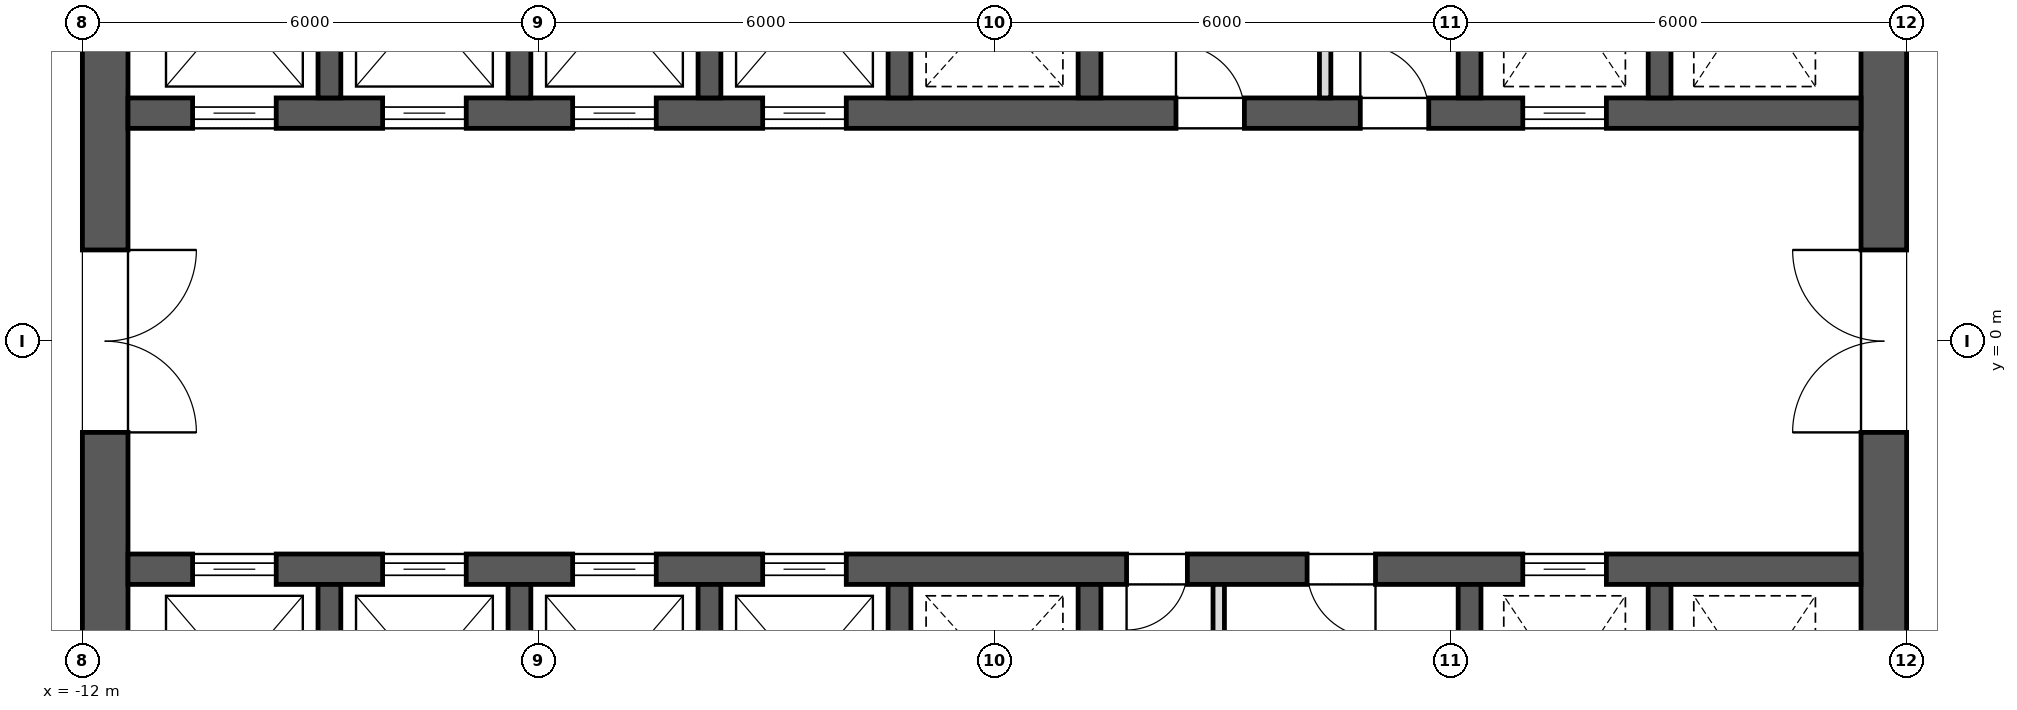
"""IFC4 building model, lengths in metres.
Left out: names, types, materials, properties, quantities, classifications, styles, units other than length and angle.
Written with IfcOpenShell. Run it as: python <this file> out.ifc"""

import sys

from ifc_helpers import new_model, si_unit, direction, frame, frame_2d, origin, place, context, subcontext, project, spatial, rectangle, extrude, element, fill, save


model = new_model("IFC4")
c1 = context("Model", 3, precision=1e-05, world=origin(), true_north=direction((0.0, 1.0)))
c2 = subcontext(c1, "Body", "Model", "MODEL_VIEW")
j1 = project(units=[si_unit("LENGTHUNIT", "METRE"), si_unit("PLANEANGLEUNIT", "RADIAN")], contexts=[c1])
p1 = place(None, origin())
s1 = spatial("IfcSite", under=j1, at=p1, CompositionType="ELEMENT")
p2 = place(p1, origin())
s2 = spatial("IfcBuilding", under=s1, at=p2, CompositionType="ELEMENT")
p3 = place(p2, frame((0.0, 0.0, 178.9)))
s3 = spatial("IfcBuildingStorey", under=s2, at=p3, CompositionType="ELEMENT", Elevation=178.9)
p4 = place(p3, frame((11.7, -11.4, 0.0), z_axis=(0.0, 0.0, 1.0), x_axis=(0.0, 1.0, 0.0)))
e1 = element("IfcWall", 1, at=p4, inside=s3, PredefinedType="SHEAR", context=c2, shape_type="SweptSolid", body=[
    extrude(rectangle(XDim=22.8, YDim=0.6, at=frame_2d((11.4, 0.0))), origin(), (0.0, 0.0, 1.0), 4.0),
])
p5 = place(p4, frame((10.2, 0.0, 0.0)))
e2 = element("IfcOpeningElement", 2, at=p5, cuts=e1, PredefinedType="OPENING", context=c2, shape_type="SweptSolid", body=[
    extrude(rectangle(XDim=2.4, YDim=2.1, at=frame_2d((1.2, 1.05))), frame((0.0, 0.312, 0.0), z_axis=(0.0, -1.0, 0.0), x_axis=(1.0, 0.0, 0.0)), (0.0, 0.0, 1.0), 0.624),
])
p6 = place(p4, frame((19.5, 0.0, 0.0)))
e3 = element("IfcOpeningElement", 3, at=p6, cuts=e1, PredefinedType="OPENING", context=c2, shape_type="SweptSolid", body=[
    extrude(rectangle(XDim=1.2, YDim=2.1, at=frame_2d((0.6, 1.05))), frame((0.0, 0.312, 0.0), z_axis=(0.0, -1.0, 0.0), x_axis=(1.0, 0.0, 0.0)), (0.0, 0.0, 1.0), 0.624),
])
p7 = place(p4, frame((2.1, 0.0, 0.0)))
e4 = element("IfcOpeningElement", 4, at=p7, cuts=e1, PredefinedType="OPENING", context=c2, shape_type="SweptSolid", body=[
    extrude(rectangle(XDim=1.2, YDim=2.1, at=frame_2d((0.6, 1.05))), frame((0.0, 0.312, 0.0), z_axis=(0.0, -1.0, 0.0), x_axis=(1.0, 0.0, 0.0)), (0.0, 0.0, 1.0), 0.624),
])
p8 = place(p3, frame((-11.7, -11.4, 0.0), z_axis=(0.0, 0.0, 1.0), x_axis=(0.0, 1.0, 0.0)))
e5 = element("IfcWall", 5, at=p8, inside=s3, PredefinedType="SHEAR", context=c2, shape_type="SweptSolid", body=[
    extrude(rectangle(XDim=22.8, YDim=0.6, at=frame_2d((11.4, 0.0))), origin(), (0.0, 0.0, 1.0), 4.0),
])
p9 = place(p8, frame((10.2, 0.0, 0.0)))
e6 = element("IfcOpeningElement", 6, at=p9, cuts=e5, PredefinedType="OPENING", context=c2, shape_type="SweptSolid", body=[
    extrude(rectangle(XDim=2.4, YDim=2.1, at=frame_2d((1.2, 1.05))), frame((0.0, 0.312, 0.0), z_axis=(0.0, -1.0, 0.0), x_axis=(1.0, 0.0, 0.0)), (0.0, 0.0, 1.0), 0.624),
])
p10 = place(p8, frame((18.925, 0.0, 0.0)))
e7 = element("IfcOpeningElement", 7, at=p10, cuts=e5, PredefinedType="OPENING", context=c2, shape_type="SweptSolid", body=[
    extrude(rectangle(XDim=1.2, YDim=2.1, at=frame_2d((0.6, 1.05))), frame((0.0, 0.312, 0.0), z_axis=(0.0, -1.0, 0.0), x_axis=(1.0, 0.0, 0.0)), (0.0, 0.0, 1.0), 0.624),
])
p11 = place(p8, frame((2.675, 0.0, 0.0)))
e8 = element("IfcOpeningElement", 8, at=p11, cuts=e5, PredefinedType="OPENING", context=c2, shape_type="SweptSolid", body=[
    extrude(rectangle(XDim=1.2, YDim=2.1, at=frame_2d((0.6, 1.05))), frame((0.0, 0.312, 0.0), z_axis=(0.0, -1.0, 0.0), x_axis=(1.0, 0.0, 0.0)), (0.0, 0.0, 1.0), 0.624),
])
p12 = place(p3, frame((-11.4, 3.0, 0.0), z_axis=(0.0, 0.0, 1.0), x_axis=(1.0, 0.0, 0.0)))
e9 = element("IfcWall", 9, at=p12, inside=s3, PredefinedType="SHEAR", context=c2, shape_type="SweptSolid", body=[
    extrude(rectangle(XDim=22.8, YDim=0.4, at=frame_2d((11.4, 0.0))), origin(), (0.0, 0.0, 1.0), 4.0),
])
p13 = place(p12, frame((0.85, 0.0, 0.0)))
e10 = element("IfcOpeningElement", 10, at=p13, cuts=e9, PredefinedType="OPENING", context=c2, shape_type="SweptSolid", body=[
    extrude(rectangle(XDim=1.1, YDim=2.1, at=frame_2d((0.55, 1.05))), frame((0.0, 0.212, 0.0), z_axis=(0.0, -1.0, 0.0), x_axis=(1.0, 0.0, 0.0)), (0.0, 0.0, 1.0), 0.424),
])
p14 = place(p12, frame((3.35, 0.0, 0.0)))
e11 = element("IfcOpeningElement", 11, at=p14, cuts=e9, PredefinedType="OPENING", context=c2, shape_type="SweptSolid", body=[
    extrude(rectangle(XDim=1.1, YDim=2.1, at=frame_2d((0.55, 1.05))), frame((0.0, 0.212, 0.0), z_axis=(0.0, -1.0, 0.0), x_axis=(1.0, 0.0, 0.0)), (0.0, 0.0, 1.0), 0.424),
])
p15 = place(p12, frame((5.85, 0.0, 0.0)))
e12 = element("IfcOpeningElement", 12, at=p15, cuts=e9, PredefinedType="OPENING", context=c2, shape_type="SweptSolid", body=[
    extrude(rectangle(XDim=1.1, YDim=2.1, at=frame_2d((0.55, 1.05))), frame((0.0, 0.212, 0.0), z_axis=(0.0, -1.0, 0.0), x_axis=(1.0, 0.0, 0.0)), (0.0, 0.0, 1.0), 0.424),
])
p16 = place(p12, frame((8.35, 0.0, 0.0)))
e13 = element("IfcOpeningElement", 13, at=p16, cuts=e9, PredefinedType="OPENING", context=c2, shape_type="SweptSolid", body=[
    extrude(rectangle(XDim=1.1, YDim=2.1, at=frame_2d((0.55, 1.05))), frame((0.0, 0.212, 0.0), z_axis=(0.0, -1.0, 0.0), x_axis=(1.0, 0.0, 0.0)), (0.0, 0.0, 1.0), 0.424),
])
p17 = place(p12, frame((18.35, 0.0, 0.0)))
e14 = element("IfcOpeningElement", 14, at=p17, cuts=e9, PredefinedType="OPENING", context=c2, shape_type="SweptSolid", body=[
    extrude(rectangle(XDim=1.1, YDim=2.1, at=frame_2d((0.55, 1.05))), frame((0.0, 0.212, 0.0), z_axis=(0.0, -1.0, 0.0), x_axis=(1.0, 0.0, 0.0)), (0.0, 0.0, 1.0), 0.424),
])
p18 = place(p12, frame((13.788, 0.0, 0.0)))
e15 = element("IfcOpeningElement", 15, at=p18, cuts=e9, PredefinedType="OPENING", context=c2, shape_type="SweptSolid", body=[
    extrude(rectangle(XDim=0.9, YDim=2.1, at=frame_2d((0.45, 1.05))), frame((0.0, 0.212, 0.0), z_axis=(0.0, -1.0, 0.0), x_axis=(1.0, 0.0, 0.0)), (0.0, 0.0, 1.0), 0.424),
])
p19 = place(p12, frame((16.212, 0.0, 0.0)))
e16 = element("IfcOpeningElement", 16, at=p19, cuts=e9, PredefinedType="OPENING", context=c2, shape_type="SweptSolid", body=[
    extrude(rectangle(XDim=0.9, YDim=2.1, at=frame_2d((0.45, 1.05))), frame((0.0, 0.212, 0.0), z_axis=(0.0, -1.0, 0.0), x_axis=(1.0, 0.0, 0.0)), (0.0, 0.0, 1.0), 0.424),
])
for number, where, z_axis, x_axis in (
    (17, (-8.75, 3.2, 0.0), (0.0, 0.0, 1.0), (0.0, 1.0, 0.0)),
    (18, (-6.25, 3.2, 0.0), (0.0, 0.0, 1.0), (0.0, 1.0, 0.0)),
    (19, (-3.75, 3.2, 0.0), (0.0, 0.0, 1.0), (0.0, 1.0, 0.0)),
    (20, (-1.25, 3.2, 0.0), (0.0, 0.0, 1.0), (0.0, 1.0, 0.0)),
    (21, (1.25, 3.2, 0.0), (0.0, 0.0, 1.0), (0.0, 1.0, 0.0)),
    (22, (6.25, 3.2, 0.0), (0.0, 0.0, 1.0), (0.0, 1.0, 0.0)),
    (23, (8.75, 3.2, 0.0), (0.0, 0.0, 1.0), (0.0, 1.0, 0.0)),
):
    element("IfcWall", number, at=place(p3, frame(where, z_axis=z_axis, x_axis=x_axis)), inside=s3, PredefinedType="SHEAR", context=c2, shape_type="SweptSolid", body=[
        extrude(rectangle(XDim=2.9, YDim=0.3, at=frame_2d((1.45, 0.0))), origin(), (0.0, 0.0, 1.0), 4.0),
    ])
p20 = place(p3, frame((-11.4, -3.0, 0.0), z_axis=(0.0, 0.0, 1.0), x_axis=(1.0, 0.0, 0.0)))
e24 = element("IfcWall", 24, at=p20, inside=s3, PredefinedType="SHEAR", context=c2, shape_type="SweptSolid", body=[
    extrude(rectangle(XDim=22.8, YDim=0.4, at=frame_2d((11.4, 0.0))), origin(), (0.0, 0.0, 1.0), 4.0),
])
p21 = place(p20, frame((0.85, 0.0, 0.0)))
e25 = element("IfcOpeningElement", 25, at=p21, cuts=e24, PredefinedType="OPENING", context=c2, shape_type="SweptSolid", body=[
    extrude(rectangle(XDim=1.1, YDim=2.1, at=frame_2d((0.55, 1.05))), frame((0.0, 0.212, 0.0), z_axis=(0.0, -1.0, 0.0), x_axis=(1.0, 0.0, 0.0)), (0.0, 0.0, 1.0), 0.424),
])
p22 = place(p20, frame((3.35, 0.0, 0.0)))
e26 = element("IfcOpeningElement", 26, at=p22, cuts=e24, PredefinedType="OPENING", context=c2, shape_type="SweptSolid", body=[
    extrude(rectangle(XDim=1.1, YDim=2.1, at=frame_2d((0.55, 1.05))), frame((0.0, 0.212, 0.0), z_axis=(0.0, -1.0, 0.0), x_axis=(1.0, 0.0, 0.0)), (0.0, 0.0, 1.0), 0.424),
])
p23 = place(p20, frame((5.85, 0.0, 0.0)))
e27 = element("IfcOpeningElement", 27, at=p23, cuts=e24, PredefinedType="OPENING", context=c2, shape_type="SweptSolid", body=[
    extrude(rectangle(XDim=1.1, YDim=2.1, at=frame_2d((0.55, 1.05))), frame((0.0, 0.212, 0.0), z_axis=(0.0, -1.0, 0.0), x_axis=(1.0, 0.0, 0.0)), (0.0, 0.0, 1.0), 0.424),
])
p24 = place(p20, frame((8.35, 0.0, 0.0)))
e28 = element("IfcOpeningElement", 28, at=p24, cuts=e24, PredefinedType="OPENING", context=c2, shape_type="SweptSolid", body=[
    extrude(rectangle(XDim=1.1, YDim=2.1, at=frame_2d((0.55, 1.05))), frame((0.0, 0.212, 0.0), z_axis=(0.0, -1.0, 0.0), x_axis=(1.0, 0.0, 0.0)), (0.0, 0.0, 1.0), 0.424),
])
p25 = place(p20, frame((18.35, 0.0, 0.0)))
e29 = element("IfcOpeningElement", 29, at=p25, cuts=e24, PredefinedType="OPENING", context=c2, shape_type="SweptSolid", body=[
    extrude(rectangle(XDim=1.1, YDim=2.1, at=frame_2d((0.55, 1.05))), frame((0.0, 0.212, 0.0), z_axis=(0.0, -1.0, 0.0), x_axis=(1.0, 0.0, 0.0)), (0.0, 0.0, 1.0), 0.424),
])
p26 = place(p20, frame((13.137, 0.0, 0.0)))
e30 = element("IfcOpeningElement", 30, at=p26, cuts=e24, PredefinedType="OPENING", context=c2, shape_type="SweptSolid", body=[
    extrude(rectangle(XDim=0.8, YDim=2.1, at=frame_2d((0.4, 1.05))), frame((0.0, 0.212, 0.0), z_axis=(0.0, -1.0, 0.0), x_axis=(1.0, 0.0, 0.0)), (0.0, 0.0, 1.0), 0.424),
])
p27 = place(p20, frame((15.512, 0.0, 0.0)))
e31 = element("IfcOpeningElement", 31, at=p27, cuts=e24, PredefinedType="OPENING", context=c2, shape_type="SweptSolid", body=[
    extrude(rectangle(XDim=0.9, YDim=2.1, at=frame_2d((0.45, 1.05))), frame((0.0, 0.212, 0.0), z_axis=(0.0, -1.0, 0.0), x_axis=(1.0, 0.0, 0.0)), (0.0, 0.0, 1.0), 0.424),
])
for number, where, z_axis, x_axis in (
    (32, (-8.75, -6.1, 0.0), (0.0, 0.0, 1.0), (0.0, 1.0, 0.0)),
    (33, (-6.25, -6.1, 0.0), (0.0, 0.0, 1.0), (0.0, 1.0, 0.0)),
    (34, (-3.75, -6.1, 0.0), (0.0, 0.0, 1.0), (0.0, 1.0, 0.0)),
    (35, (-1.25, -6.1, 0.0), (0.0, 0.0, 1.0), (0.0, 1.0, 0.0)),
    (36, (1.25, -6.1, 0.0), (0.0, 0.0, 1.0), (0.0, 1.0, 0.0)),
    (37, (6.25, -6.1, 0.0), (0.0, 0.0, 1.0), (0.0, 1.0, 0.0)),
    (38, (8.75, -6.1, 0.0), (0.0, 0.0, 1.0), (0.0, 1.0, 0.0)),
):
    element("IfcWall", number, at=place(p3, frame(where, z_axis=z_axis, x_axis=x_axis)), inside=s3, PredefinedType="SHEAR", context=c2, shape_type="SweptSolid", body=[
        extrude(rectangle(XDim=2.9, YDim=0.3, at=frame_2d((1.45, 0.0))), origin(), (0.0, 0.0, 1.0), 4.0),
    ])
for number, where, z_axis, x_axis in (
    (39, (4.35, 3.2, 0.0), (0.0, 0.0, 1.0), (0.0, 1.0, 0.0)),
    (40, (2.95, -6.1, 0.0), (0.0, 0.0, 1.0), (0.0, 1.0, 0.0)),
):
    element("IfcWall", number, at=place(p3, frame(where, z_axis=z_axis, x_axis=x_axis)), inside=s3, PredefinedType="PARTITIONING", context=c2, shape_type="SweptSolid", body=[
        extrude(rectangle(XDim=2.9, YDim=0.15, at=frame_2d((1.45, 0.0))), origin(), (0.0, 0.0, 1.0), 3.7),
    ])
p28 = place(p13, origin())
e41 = element("IfcDoor", 41, at=p28, inside=s3, OperationType="SLIDING_TO_LEFT", PredefinedType="DOOR", context=c2, shape_type="SweptSolid", body=[
    extrude(rectangle(XDim=1.1, YDim=2.1, at=frame_2d((0.55, 1.05))), frame((0.0, 0.025, 0.0), z_axis=(0.0, -1.0, 0.0), x_axis=(1.0, 0.0, 0.0)), (0.0, 0.0, 1.0), 0.05),
])
fill(e10, e41)
p29 = place(p14, origin())
e42 = element("IfcDoor", 42, at=p29, inside=s3, OperationType="SLIDING_TO_LEFT", PredefinedType="DOOR", context=c2, shape_type="SweptSolid", body=[
    extrude(rectangle(XDim=1.1, YDim=2.1, at=frame_2d((0.55, 1.05))), frame((0.0, 0.025, 0.0), z_axis=(0.0, -1.0, 0.0), x_axis=(1.0, 0.0, 0.0)), (0.0, 0.0, 1.0), 0.05),
])
fill(e11, e42)
p30 = place(p21, origin())
e43 = element("IfcDoor", 43, at=p30, inside=s3, OperationType="SLIDING_TO_LEFT", PredefinedType="DOOR", context=c2, shape_type="SweptSolid", body=[
    extrude(rectangle(XDim=1.1, YDim=2.1, at=frame_2d((0.55, 1.05))), frame((0.0, 0.025, 0.0), z_axis=(0.0, -1.0, 0.0), x_axis=(1.0, 0.0, 0.0)), (0.0, 0.0, 1.0), 0.05),
])
fill(e25, e43)
p31 = place(p22, origin())
e44 = element("IfcDoor", 44, at=p31, inside=s3, OperationType="SLIDING_TO_LEFT", PredefinedType="DOOR", context=c2, shape_type="SweptSolid", body=[
    extrude(rectangle(XDim=1.1, YDim=2.1, at=frame_2d((0.55, 1.05))), frame((0.0, 0.025, 0.0), z_axis=(0.0, -1.0, 0.0), x_axis=(1.0, 0.0, 0.0)), (0.0, 0.0, 1.0), 0.05),
])
fill(e26, e44)
p32 = place(p15, origin())
e45 = element("IfcDoor", 45, at=p32, inside=s3, OperationType="SLIDING_TO_LEFT", PredefinedType="DOOR", context=c2, shape_type="SweptSolid", body=[
    extrude(rectangle(XDim=1.1, YDim=2.1, at=frame_2d((0.55, 1.05))), frame((0.0, 0.025, 0.0), z_axis=(0.0, -1.0, 0.0), x_axis=(1.0, 0.0, 0.0)), (0.0, 0.0, 1.0), 0.05),
])
fill(e12, e45)
p33 = place(p16, origin())
e46 = element("IfcDoor", 46, at=p33, inside=s3, OperationType="SLIDING_TO_LEFT", PredefinedType="DOOR", context=c2, shape_type="SweptSolid", body=[
    extrude(rectangle(XDim=1.1, YDim=2.1, at=frame_2d((0.55, 1.05))), frame((0.0, 0.025, 0.0), z_axis=(0.0, -1.0, 0.0), x_axis=(1.0, 0.0, 0.0)), (0.0, 0.0, 1.0), 0.05),
])
fill(e13, e46)
p34 = place(p23, origin())
e47 = element("IfcDoor", 47, at=p34, inside=s3, OperationType="SLIDING_TO_LEFT", PredefinedType="DOOR", context=c2, shape_type="SweptSolid", body=[
    extrude(rectangle(XDim=1.1, YDim=2.1, at=frame_2d((0.55, 1.05))), frame((0.0, 0.025, 0.0), z_axis=(0.0, -1.0, 0.0), x_axis=(1.0, 0.0, 0.0)), (0.0, 0.0, 1.0), 0.05),
])
fill(e27, e47)
p35 = place(p24, origin())
e48 = element("IfcDoor", 48, at=p35, inside=s3, OperationType="SLIDING_TO_LEFT", PredefinedType="DOOR", context=c2, shape_type="SweptSolid", body=[
    extrude(rectangle(XDim=1.1, YDim=2.1, at=frame_2d((0.55, 1.05))), frame((0.0, 0.025, 0.0), z_axis=(0.0, -1.0, 0.0), x_axis=(1.0, 0.0, 0.0)), (0.0, 0.0, 1.0), 0.05),
])
fill(e28, e48)
p36 = place(p17, origin())
e49 = element("IfcDoor", 49, at=p36, inside=s3, OperationType="SLIDING_TO_LEFT", PredefinedType="DOOR", context=c2, shape_type="SweptSolid", body=[
    extrude(rectangle(XDim=1.1, YDim=2.1, at=frame_2d((0.55, 1.05))), frame((0.0, 0.025, 0.0), z_axis=(0.0, -1.0, 0.0), x_axis=(1.0, 0.0, 0.0)), (0.0, 0.0, 1.0), 0.05),
])
fill(e14, e49)
p37 = place(p25, origin())
e50 = element("IfcDoor", 50, at=p37, inside=s3, OperationType="SLIDING_TO_LEFT", PredefinedType="DOOR", context=c2, shape_type="SweptSolid", body=[
    extrude(rectangle(XDim=1.1, YDim=2.1, at=frame_2d((0.55, 1.05))), frame((0.0, 0.025, 0.0), z_axis=(0.0, -1.0, 0.0), x_axis=(1.0, 0.0, 0.0)), (0.0, 0.0, 1.0), 0.05),
])
fill(e29, e50)
p38 = place(p9, frame((2.4, 0.0, 0.0), z_axis=(0.0, 0.0, 1.0), x_axis=(-1.0, 0.0, 0.0)))
e51 = element("IfcDoor", 51, at=p38, inside=s3, OperationType="DOUBLE_DOOR_SINGLE_SWING", PredefinedType="DOOR", context=c2, shape_type="SweptSolid", body=[
    extrude(rectangle(XDim=2.4, YDim=2.1, at=frame_2d((1.2, 1.05))), frame((0.0, 0.025, 0.0), z_axis=(0.0, -1.0, 0.0), x_axis=(1.0, 0.0, 0.0)), (0.0, 0.0, 1.0), 0.05),
])
fill(e6, e51)
p39 = place(p5, origin())
e52 = element("IfcDoor", 52, at=p39, inside=s3, OperationType="DOUBLE_DOOR_SINGLE_SWING", PredefinedType="DOOR", context=c2, shape_type="SweptSolid", body=[
    extrude(rectangle(XDim=2.4, YDim=2.1, at=frame_2d((1.2, 1.05))), frame((0.0, 0.025, 0.0), z_axis=(0.0, -1.0, 0.0), x_axis=(1.0, 0.0, 0.0)), (0.0, 0.0, 1.0), 0.05),
])
fill(e2, e52)
p40 = place(p18, origin())
e53 = element("IfcDoor", 53, at=p40, inside=s3, OperationType="SINGLE_SWING_RIGHT", PredefinedType="DOOR", context=c2, shape_type="SweptSolid", body=[
    extrude(rectangle(XDim=0.9, YDim=2.1, at=frame_2d((0.45, 1.05))), frame((0.0, 0.025, 0.0), z_axis=(0.0, -1.0, 0.0), x_axis=(1.0, 0.0, 0.0)), (0.0, 0.0, 1.0), 0.05),
])
fill(e15, e53)
p41 = place(p19, origin())
e54 = element("IfcDoor", 54, at=p41, inside=s3, OperationType="SINGLE_SWING_RIGHT", PredefinedType="DOOR", context=c2, shape_type="SweptSolid", body=[
    extrude(rectangle(XDim=0.9, YDim=2.1, at=frame_2d((0.45, 1.05))), frame((0.0, 0.025, 0.0), z_axis=(0.0, -1.0, 0.0), x_axis=(1.0, 0.0, 0.0)), (0.0, 0.0, 1.0), 0.05),
])
fill(e16, e54)
p42 = place(p26, frame((0.8, 0.0, 0.0), z_axis=(0.0, 0.0, 1.0), x_axis=(-1.0, 0.0, 0.0)))
e55 = element("IfcDoor", 55, at=p42, inside=s3, OperationType="SINGLE_SWING_LEFT", PredefinedType="DOOR", context=c2, shape_type="SweptSolid", body=[
    extrude(rectangle(XDim=0.8, YDim=2.1, at=frame_2d((0.4, 1.05))), frame((0.0, 0.025, 0.0), z_axis=(0.0, -1.0, 0.0), x_axis=(1.0, 0.0, 0.0)), (0.0, 0.0, 1.0), 0.05),
])
fill(e30, e55)
p43 = place(p27, frame((0.9, 0.0, 0.0), z_axis=(0.0, 0.0, 1.0), x_axis=(-1.0, 0.0, 0.0)))
e56 = element("IfcDoor", 56, at=p43, inside=s3, OperationType="SINGLE_SWING_RIGHT", PredefinedType="DOOR", context=c2, shape_type="SweptSolid", body=[
    extrude(rectangle(XDim=0.9, YDim=2.1, at=frame_2d((0.45, 1.05))), frame((0.0, 0.025, 0.0), z_axis=(0.0, -1.0, 0.0), x_axis=(1.0, 0.0, 0.0)), (0.0, 0.0, 1.0), 0.05),
])
fill(e31, e56)
save(model, sys.argv[1])
